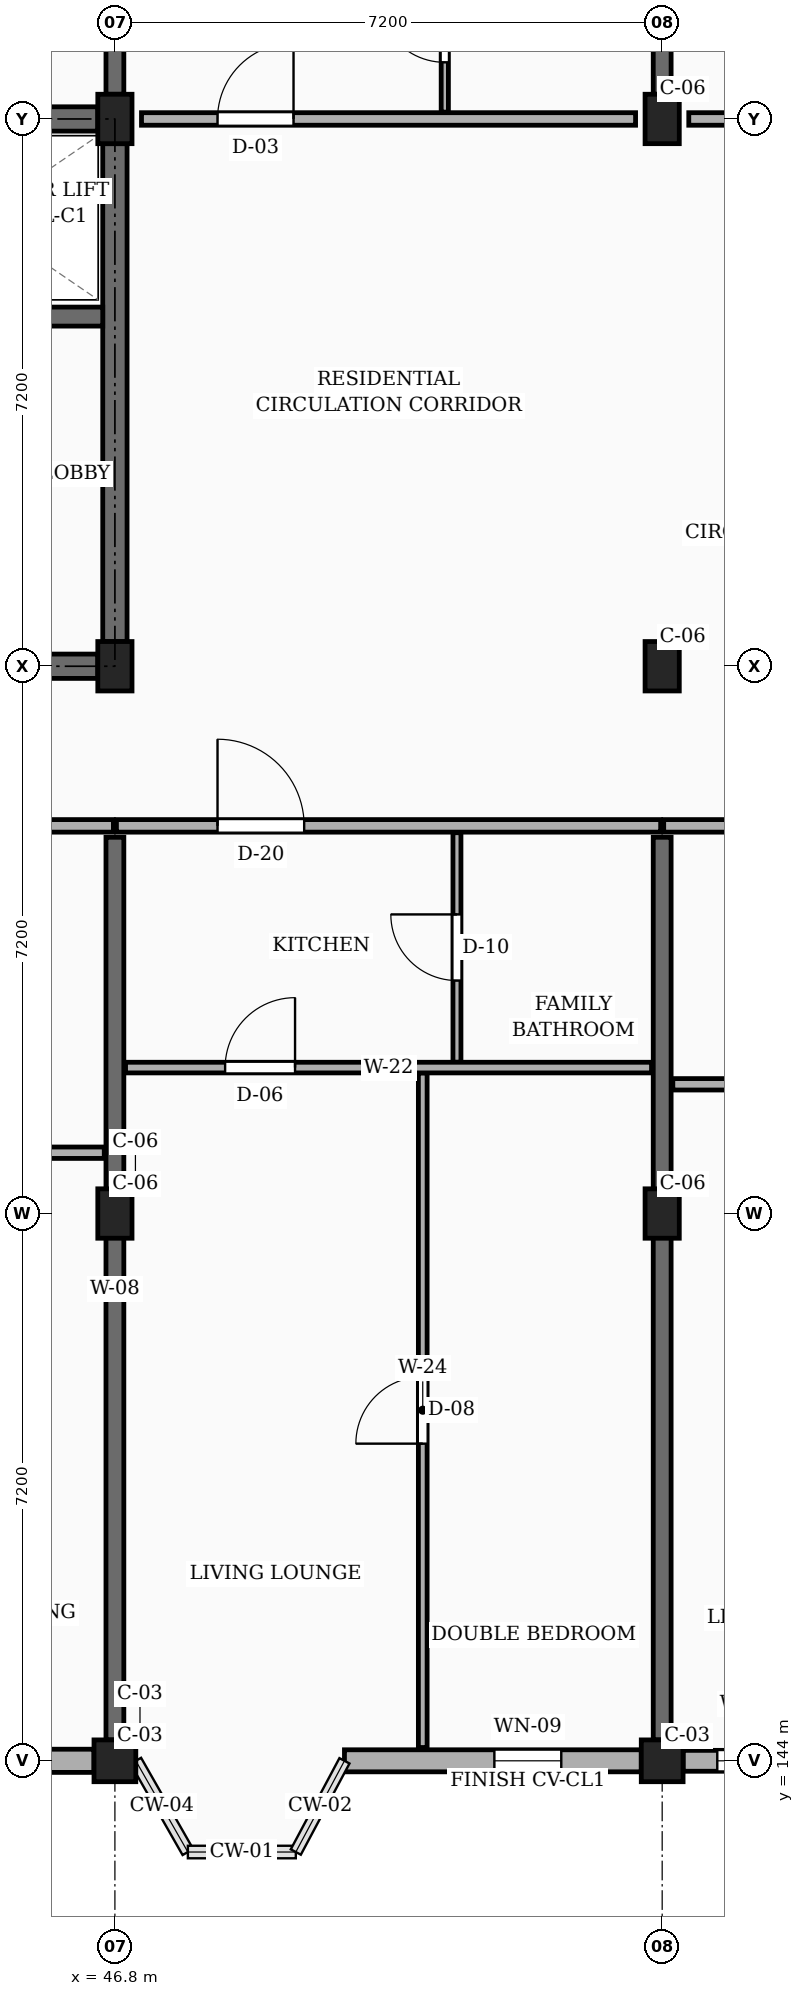
"""IFC4 building model, lengths in metres.
Left out: names, types, materials, properties, quantities, classifications, styles, units other than length and angle.
Written with IfcOpenShell. Run it as: python <this file> out.ifc"""

import sys

from ifc_helpers import new_model, si_unit, direction, frame, frame_2d, origin, origin_2d, place, context, subcontext, project, spatial, rectangle, extrude, element, fill, save


model = new_model("IFC4")
c1 = context("Model", 3, precision=1e-05, world=origin(), true_north=direction((0.0, 1.0)))
c2 = subcontext(c1, "Body", "Model", "MODEL_VIEW")
j1 = project(units=[si_unit("LENGTHUNIT", "METRE"), si_unit("PLANEANGLEUNIT", "RADIAN")], contexts=[c1])
p1 = place(None, origin())
s1 = spatial("IfcSite", under=j1, at=p1, CompositionType="ELEMENT")
p2 = place(p1, origin())
s2 = spatial("IfcBuilding", under=s1, at=p2, CompositionType="ELEMENT")
p3 = place(p2, frame((0.0, 0.0, 17.1)))
s3 = spatial("IfcBuildingStorey", under=s2, at=p3, CompositionType="ELEMENT", Elevation=17.1)
p4 = place(p3, frame((46.8, 144.0, 0.0), z_axis=(0.0, 0.0, 1.0), x_axis=(1.0, 0.0, 0.0)))
e1 = element("IfcColumn", 1, at=p4, inside=s3, PredefinedType="COLUMN", context=c2, shape_type="SweptSolid", body=[
    extrude(rectangle(XDim=0.55, YDim=0.55, at=origin_2d()), origin(), (0.0, 0.0, 1.0), 3.15),
])
for number, where, z_axis, x_axis in (
    (2, (46.8, 151.2, 0.0), (0.0, 0.0, 1.0), (1.0, 0.0, 0.0)),
    (3, (46.8, 158.4, 0.0), (0.0, 0.0, 1.0), (1.0, 0.0, 0.0)),
    (4, (46.8, 165.6, 0.0), (0.0, 0.0, 1.0), (1.0, 0.0, 0.0)),
):
    element("IfcColumn", number, at=place(p3, frame(where, z_axis=z_axis, x_axis=x_axis)), inside=s3, PredefinedType="COLUMN", context=c2, shape_type="SweptSolid", body=[
        extrude(rectangle(XDim=0.45, YDim=0.65, at=origin_2d()), origin(), (0.0, 0.0, 1.0), 3.15),
    ])
p5 = place(p3, frame((54.0, 144.0, 0.0), z_axis=(0.0, 0.0, 1.0), x_axis=(1.0, 0.0, 0.0)))
e5 = element("IfcColumn", 5, at=p5, inside=s3, PredefinedType="COLUMN", context=c2, shape_type="SweptSolid", body=[
    extrude(rectangle(XDim=0.55, YDim=0.55, at=origin_2d()), origin(), (0.0, 0.0, 1.0), 3.15),
])
for number, where, z_axis, x_axis in (
    (6, (54.0, 151.2, 0.0), (0.0, 0.0, 1.0), (1.0, 0.0, 0.0)),
    (7, (54.0, 158.4, 0.0), (0.0, 0.0, 1.0), (1.0, 0.0, 0.0)),
    (8, (54.0, 165.6, 0.0), (0.0, 0.0, 1.0), (1.0, 0.0, 0.0)),
):
    element("IfcColumn", number, at=place(p3, frame(where, z_axis=z_axis, x_axis=x_axis)), inside=s3, PredefinedType="COLUMN", context=c2, shape_type="SweptSolid", body=[
        extrude(rectangle(XDim=0.45, YDim=0.65, at=origin_2d()), origin(), (0.0, 0.0, 1.0), 3.15),
    ])
p6 = place(p3, frame((46.8, 144.275, 0.0), z_axis=(0.0, 0.0, 1.0), x_axis=(0.0, 1.0, 0.0)))
e9 = element("IfcWall", 9, at=p6, inside=s3, PredefinedType="SOLIDWALL", context=c2, shape_type="SweptSolid", body=[
    extrude(rectangle(XDim=11.875, YDim=0.235, at=frame_2d((5.938, 0.0))), origin(), (0.0, 0.0, 1.0), 2.185),
])
p7 = place(p3, frame((46.8, 165.925, 0.0), z_axis=(0.0, 0.0, 1.0), x_axis=(0.0, 1.0, 0.0)))
e10 = element("IfcWall", 10, at=p7, inside=s3, PredefinedType="SOLIDWALL", context=c2, shape_type="SweptSolid", body=[
    extrude(rectangle(XDim=6.6, YDim=0.235, at=frame_2d((3.3, 0.0))), origin(), (0.0, 0.0, 1.0), 2.185),
])
p8 = place(p3, frame((54.0, 144.275, 0.0), z_axis=(0.0, 0.0, 1.0), x_axis=(0.0, 1.0, 0.0)))
e11 = element("IfcWall", 11, at=p8, inside=s3, PredefinedType="SOLIDWALL", context=c2, shape_type="SweptSolid", body=[
    extrude(rectangle(XDim=11.875, YDim=0.235, at=frame_2d((5.938, 0.0))), origin(), (0.0, 0.0, 1.0), 2.185),
])
p9 = place(p3, frame((54.0, 165.925, 0.0), z_axis=(0.0, 0.0, 1.0), x_axis=(0.0, 1.0, 0.0)))
e12 = element("IfcWall", 12, at=p9, inside=s3, PredefinedType="SOLIDWALL", context=c2, shape_type="SweptSolid", body=[
    extrude(rectangle(XDim=6.6, YDim=0.235, at=frame_2d((3.3, 0.0))), origin(), (0.0, 0.0, 1.0), 2.185),
])
p10 = place(p3, frame((39.875, 144.0, 0.0), z_axis=(0.0, 0.0, 1.0), x_axis=(1.0, 0.0, 0.0)))
e13 = element("IfcWall", 13, at=p10, inside=s3, PredefinedType="SOLIDWALL", context=c2, shape_type="SweptSolid", body=[
    extrude(rectangle(XDim=6.65, YDim=0.305, at=frame_2d((3.325, 0.0))), origin(), (0.0, 0.0, 1.0), 2.455),
])
p11 = place(p10, frame((0.45, 0.0, 0.78)))
e14 = element("IfcOpeningElement", 14, at=p11, cuts=e13, PredefinedType="OPENING", context=c2, shape_type="SweptSolid", body=[
    extrude(rectangle(XDim=1.32, YDim=1.15, at=frame_2d((0.66, 0.575))), frame((0.0, 0.163, 0.0), z_axis=(0.0, -1.0, 0.0), x_axis=(1.0, 0.0, 0.0)), (0.0, 0.0, 1.0), 0.325),
])
p12 = place(p10, frame((4.65, 0.0, 0.78)))
e15 = element("IfcOpeningElement", 15, at=p12, cuts=e13, PredefinedType="OPENING", context=c2, shape_type="SweptSolid", body=[
    extrude(rectangle(XDim=0.88, YDim=1.26, at=frame_2d((0.44, 0.63))), frame((0.0, 0.163, 0.0), z_axis=(0.0, -1.0, 0.0), x_axis=(1.0, 0.0, 0.0)), (0.0, 0.0, 1.0), 0.325),
])
p13 = place(p3, frame((49.82, 144.0, 0.0), z_axis=(0.0, 0.0, 1.0), x_axis=(1.0, 0.0, 0.0)))
e16 = element("IfcWall", 16, at=p13, inside=s3, PredefinedType="SOLIDWALL", context=c2, shape_type="SweptSolid", body=[
    extrude(rectangle(XDim=3.905, YDim=0.29, at=frame_2d((1.953, 0.0))), origin(), (0.0, 0.0, 1.0), 2.455),
])
p14 = place(p13, frame((1.972, 0.0, 0.78)))
e17 = element("IfcOpeningElement", 17, at=p14, cuts=e16, PredefinedType="OPENING", context=c2, shape_type="SweptSolid", body=[
    extrude(rectangle(XDim=0.88, YDim=1.26, at=frame_2d((0.44, 0.63))), frame((0.0, 0.155, 0.0), z_axis=(0.0, -1.0, 0.0), x_axis=(1.0, 0.0, 0.0)), (0.0, 0.0, 1.0), 0.31),
])
p15 = place(p3, frame((54.275, 144.0, 0.0), z_axis=(0.0, 0.0, 1.0), x_axis=(1.0, 0.0, 0.0)))
e18 = element("IfcWall", 18, at=p15, inside=s3, PredefinedType="SOLIDWALL", context=c2, shape_type="SweptSolid", body=[
    extrude(rectangle(XDim=6.65, YDim=0.275, at=frame_2d((3.325, 0.0))), origin(), (0.0, 0.0, 1.0), 2.455),
])
p16 = place(p15, frame((0.45, 0.0, 0.78)))
e19 = element("IfcOpeningElement", 19, at=p16, cuts=e18, PredefinedType="OPENING", context=c2, shape_type="SweptSolid", body=[
    extrude(rectangle(XDim=0.96, YDim=1.26, at=frame_2d((0.48, 0.63))), frame((0.0, 0.147, 0.0), z_axis=(0.0, -1.0, 0.0), x_axis=(1.0, 0.0, 0.0)), (0.0, 0.0, 1.0), 0.295),
])
p17 = place(p15, frame((4.65, 0.0, 0.78)))
e20 = element("IfcOpeningElement", 20, at=p17, cuts=e18, PredefinedType="OPENING", context=c2, shape_type="SweptSolid", body=[
    extrude(rectangle(XDim=1.12, YDim=1.26, at=frame_2d((0.56, 0.63))), frame((0.0, 0.147, 0.0), z_axis=(0.0, -1.0, 0.0), x_axis=(1.0, 0.0, 0.0)), (0.0, 0.0, 1.0), 0.295),
])
p18 = place(p3, frame((39.825, 165.6, 0.0), z_axis=(0.0, 0.0, 1.0), x_axis=(1.0, 0.0, 0.0)))
e21 = element("IfcWall", 21, at=p18, inside=s3, PredefinedType="SHEAR", context=c2, shape_type="SweptSolid", body=[
    extrude(rectangle(XDim=6.75, YDim=0.32, at=frame_2d((3.375, 0.0))), origin(), (0.0, 0.0, 1.0), 2.885),
])
p19 = place(p3, frame((46.8, 158.725, 0.0), z_axis=(0.0, 0.0, 1.0), x_axis=(0.0, 1.0, 0.0)))
e22 = element("IfcWall", 22, at=p19, inside=s3, PredefinedType="SHEAR", context=c2, shape_type="SweptSolid", body=[
    extrude(rectangle(XDim=6.55, YDim=0.32, at=frame_2d((3.275, 0.0))), origin(), (0.0, 0.0, 1.0), 2.885),
])
p20 = place(p3, frame((39.825, 158.4, 0.0), z_axis=(0.0, 0.0, 1.0), x_axis=(1.0, 0.0, 0.0)))
e23 = element("IfcWall", 23, at=p20, inside=s3, PredefinedType="SHEAR", context=c2, shape_type="SweptSolid", body=[
    extrude(rectangle(XDim=6.75, YDim=0.32, at=frame_2d((3.375, 0.0))), origin(), (0.0, 0.0, 1.0), 2.885),
])
p21 = place(p20, frame((4.525, 0.0, 0.0)))
e24 = element("IfcOpeningElement", 24, at=p21, cuts=e23, PredefinedType="OPENING", context=c2, shape_type="SweptSolid", body=[
    extrude(rectangle(XDim=1.1, YDim=2.15, at=frame_2d((0.55, 1.075))), frame((0.0, 0.17, 0.0), z_axis=(0.0, -1.0, 0.0), x_axis=(1.0, 0.0, 0.0)), (0.0, 0.0, 1.0), 0.34),
])
p22 = place(p3, frame((43.325, 163.0, 0.0), z_axis=(0.0, 0.0, 1.0), x_axis=(1.0, 0.0, 0.0)))
e25 = element("IfcWall", 25, at=p22, inside=s3, PredefinedType="SHEAR", context=c2, shape_type="SweptSolid", body=[
    extrude(rectangle(XDim=3.315, YDim=0.25, at=frame_2d((1.657, 0.0))), origin(), (0.0, 0.0, 1.0), 2.885),
])
p23 = place(p22, frame((1.1, 0.0, 0.0)))
e26 = element("IfcOpeningElement", 26, at=p23, cuts=e25, PredefinedType="OPENING", context=c2, shape_type="SweptSolid", body=[
    extrude(rectangle(XDim=1.0, YDim=2.2, at=frame_2d((0.5, 1.1))), frame((0.0, 0.135, 0.0), z_axis=(0.0, -1.0, 0.0), x_axis=(1.0, 0.0, 0.0)), (0.0, 0.0, 1.0), 0.27),
])
p24 = place(p3, frame((39.62, 156.3, 0.0), z_axis=(0.0, 0.0, 1.0), x_axis=(1.0, 0.0, 0.0)))
e27 = element("IfcWall", 27, at=p24, inside=s3, PredefinedType="PARTITIONING", context=c2, shape_type="SweptSolid", body=[
    extrude(rectangle(XDim=7.16, YDim=0.165, at=frame_2d((3.58, 0.0))), origin(), (0.0, 0.0, 1.0), 2.32),
])
p25 = place(p24, frame((4.78, 0.0, 0.0)))
e28 = element("IfcOpeningElement", 28, at=p25, cuts=e27, PredefinedType="OPENING", context=c2, shape_type="SweptSolid", body=[
    extrude(rectangle(XDim=0.94, YDim=2.12, at=frame_2d((0.47, 1.06))), frame((0.0, 0.093, 0.0), z_axis=(0.0, -1.0, 0.0), x_axis=(1.0, 0.0, 0.0)), (0.0, 0.0, 1.0), 0.185),
])
p26 = place(p3, frame((46.82, 156.3, 0.0), z_axis=(0.0, 0.0, 1.0), x_axis=(1.0, 0.0, 0.0)))
e29 = element("IfcWall", 29, at=p26, inside=s3, PredefinedType="PARTITIONING", context=c2, shape_type="SweptSolid", body=[
    extrude(rectangle(XDim=7.16, YDim=0.165, at=frame_2d((3.58, 0.0))), origin(), (0.0, 0.0, 1.0), 2.32),
])
p27 = place(p26, frame((1.33, 0.0, 0.0)))
e30 = element("IfcOpeningElement", 30, at=p27, cuts=e29, PredefinedType="OPENING", context=c2, shape_type="SweptSolid", body=[
    extrude(rectangle(XDim=1.14, YDim=2.18, at=frame_2d((0.57, 1.09))), frame((0.0, 0.093, 0.0), z_axis=(0.0, -1.0, 0.0), x_axis=(1.0, 0.0, 0.0)), (0.0, 0.0, 1.0), 0.185),
])
p28 = place(p3, frame((54.02, 156.3, 0.0), z_axis=(0.0, 0.0, 1.0), x_axis=(1.0, 0.0, 0.0)))
e31 = element("IfcWall", 31, at=p28, inside=s3, PredefinedType="PARTITIONING", context=c2, shape_type="SweptSolid", body=[
    extrude(rectangle(XDim=7.16, YDim=0.165, at=frame_2d((3.58, 0.0))), origin(), (0.0, 0.0, 1.0), 2.32),
])
p29 = place(p28, frame((1.33, 0.0, 0.0)))
e32 = element("IfcOpeningElement", 32, at=p29, cuts=e31, PredefinedType="OPENING", context=c2, shape_type="SweptSolid", body=[
    extrude(rectangle(XDim=1.0, YDim=2.15, at=frame_2d((0.5, 1.075))), frame((0.0, 0.093, 0.0), z_axis=(0.0, -1.0, 0.0), x_axis=(1.0, 0.0, 0.0)), (0.0, 0.0, 1.0), 0.185),
])
p30 = place(p3, frame((47.15, 165.6, 0.0), z_axis=(0.0, 0.0, 1.0), x_axis=(1.0, 0.0, 0.0)))
e33 = element("IfcWall", 33, at=p30, inside=s3, PredefinedType="PARTITIONING", context=c2, shape_type="SweptSolid", body=[
    extrude(rectangle(XDim=6.5, YDim=0.165, at=frame_2d((3.25, 0.0))), origin(), (0.0, 0.0, 1.0), 2.235),
])
p31 = place(p30, frame((1.0, 0.0, 0.0)))
e34 = element("IfcOpeningElement", 34, at=p31, cuts=e33, PredefinedType="OPENING", context=c2, shape_type="SweptSolid", body=[
    extrude(rectangle(XDim=1.0, YDim=2.15, at=frame_2d((0.5, 1.075))), frame((0.0, 0.093, 0.0), z_axis=(0.0, -1.0, 0.0), x_axis=(1.0, 0.0, 0.0)), (0.0, 0.0, 1.0), 0.185),
])
p32 = place(p3, frame((54.35, 165.6, 0.0), z_axis=(0.0, 0.0, 1.0), x_axis=(1.0, 0.0, 0.0)))
e35 = element("IfcWall", 35, at=p32, inside=s3, PredefinedType="PARTITIONING", context=c2, shape_type="SweptSolid", body=[
    extrude(rectangle(XDim=6.5, YDim=0.165, at=frame_2d((3.25, 0.0))), origin(), (0.0, 0.0, 1.0), 2.235),
])
p33 = place(p32, frame((1.0, 0.0, 0.0)))
e36 = element("IfcOpeningElement", 36, at=p33, cuts=e35, PredefinedType="OPENING", context=c2, shape_type="SweptSolid", body=[
    extrude(rectangle(XDim=0.94, YDim=2.12, at=frame_2d((0.47, 1.06))), frame((0.0, 0.093, 0.0), z_axis=(0.0, -1.0, 0.0), x_axis=(1.0, 0.0, 0.0)), (0.0, 0.0, 1.0), 0.185),
])
p34 = place(p3, frame((39.74, 152.0, 0.0), z_axis=(0.0, 0.0, 1.0), x_axis=(1.0, 0.0, 0.0)))
e37 = element("IfcWall", 37, at=p34, inside=s3, PredefinedType="PARTITIONING", context=c2, shape_type="SweptSolid", body=[
    extrude(rectangle(XDim=6.92, YDim=0.15, at=frame_2d((3.46, 0.0))), origin(), (0.0, 0.0, 1.0), 2.32),
])
p35 = place(p34, frame((4.66, 0.0, 0.0)))
e38 = element("IfcOpeningElement", 38, at=p35, cuts=e37, PredefinedType="OPENING", context=c2, shape_type="SweptSolid", body=[
    extrude(rectangle(XDim=0.95, YDim=2.1, at=frame_2d((0.475, 1.05))), frame((0.0, 0.085, 0.0), z_axis=(0.0, -1.0, 0.0), x_axis=(1.0, 0.0, 0.0)), (0.0, 0.0, 1.0), 0.17),
])
p36 = place(p3, frame((50.85, 144.175, 0.0), z_axis=(0.0, 0.0, 1.0), x_axis=(0.0, 1.0, 0.0)))
e39 = element("IfcWall", 39, at=p36, inside=s3, PredefinedType="PARTITIONING", context=c2, shape_type="SweptSolid", body=[
    extrude(rectangle(XDim=8.875, YDim=0.115, at=frame_2d((4.438, 0.0))), origin(), (0.0, 0.0, 1.0), 2.32),
])
p37 = place(p36, frame((3.998, 0.0, 0.0)))
e40 = element("IfcOpeningElement", 40, at=p37, cuts=e39, PredefinedType="OPENING", context=c2, shape_type="SweptSolid", body=[
    extrude(rectangle(XDim=0.88, YDim=2.08, at=frame_2d((0.44, 1.04))), frame((0.0, 0.067, 0.0), z_axis=(0.0, -1.0, 0.0), x_axis=(1.0, 0.0, 0.0)), (0.0, 0.0, 1.0), 0.135),
])
p38 = place(p3, frame((51.3, 153.19, 0.0), z_axis=(0.0, 0.0, 1.0), x_axis=(0.0, 1.0, 0.0)))
e41 = element("IfcWall", 41, at=p38, inside=s3, PredefinedType="PARTITIONING", context=c2, shape_type="SweptSolid", body=[
    extrude(rectangle(XDim=3.02, YDim=0.105, at=frame_2d((1.51, 0.0))), origin(), (0.0, 0.0, 1.0), 2.32),
])
p39 = place(p38, frame((1.075, 0.0, 0.0)))
e42 = element("IfcOpeningElement", 42, at=p39, cuts=e41, PredefinedType="OPENING", context=c2, shape_type="SweptSolid", body=[
    extrude(rectangle(XDim=0.87, YDim=2.05, at=frame_2d((0.435, 1.025))), frame((0.0, 0.062, 0.0), z_axis=(0.0, -1.0, 0.0), x_axis=(1.0, 0.0, 0.0)), (0.0, 0.0, 1.0), 0.125),
])
p40 = place(p3, frame((46.94, 153.12, 0.0), z_axis=(0.0, 0.0, 1.0), x_axis=(1.0, 0.0, 0.0)))
e43 = element("IfcWall", 43, at=p40, inside=s3, PredefinedType="PARTITIONING", context=c2, shape_type="SweptSolid", body=[
    extrude(rectangle(XDim=6.92, YDim=0.14, at=frame_2d((3.46, 0.0))), origin(), (0.0, 0.0, 1.0), 2.32),
])
p41 = place(p40, frame((1.31, 0.0, 0.0)))
e44 = element("IfcOpeningElement", 44, at=p41, cuts=e43, PredefinedType="OPENING", context=c2, shape_type="SweptSolid", body=[
    extrude(rectangle(XDim=0.92, YDim=2.1, at=frame_2d((0.46, 1.05))), frame((0.0, 0.08, 0.0), z_axis=(0.0, -1.0, 0.0), x_axis=(1.0, 0.0, 0.0)), (0.0, 0.0, 1.0), 0.16),
])
p42 = place(p3, frame((51.14, 165.69, 0.0), z_axis=(0.0, 0.0, 1.0), x_axis=(0.0, 1.0, 0.0)))
e45 = element("IfcWall", 45, at=p42, inside=s3, PredefinedType="PARTITIONING", context=c2, shape_type="SweptSolid", body=[
    extrude(rectangle(XDim=2.18, YDim=0.095, at=frame_2d((1.09, 0.0))), origin(), (0.0, 0.0, 1.0), 2.32),
])
p43 = place(p42, frame((0.655, 0.0, 0.0)))
e46 = element("IfcOpeningElement", 46, at=p43, cuts=e45, PredefinedType="OPENING", context=c2, shape_type="SweptSolid", body=[
    extrude(rectangle(XDim=0.87, YDim=2.05, at=frame_2d((0.435, 1.025))), frame((0.0, 0.058, 0.0), z_axis=(0.0, -1.0, 0.0), x_axis=(1.0, 0.0, 0.0)), (0.0, 0.0, 1.0), 0.115),
])
p44 = place(p3, frame((54.14, 152.9, 0.0), z_axis=(0.0, 0.0, 1.0), x_axis=(1.0, 0.0, 0.0)))
e47 = element("IfcWall", 47, at=p44, inside=s3, PredefinedType="PARTITIONING", context=c2, shape_type="SweptSolid", body=[
    extrude(rectangle(XDim=6.92, YDim=0.15, at=frame_2d((3.46, 0.0))), origin(), (0.0, 0.0, 1.0), 2.32),
])
p45 = place(p44, frame((1.31, 0.0, 0.0)))
e48 = element("IfcOpeningElement", 48, at=p45, cuts=e47, PredefinedType="OPENING", context=c2, shape_type="SweptSolid", body=[
    extrude(rectangle(XDim=0.95, YDim=2.1, at=frame_2d((0.475, 1.05))), frame((0.0, 0.085, 0.0), z_axis=(0.0, -1.0, 0.0), x_axis=(1.0, 0.0, 0.0)), (0.0, 0.0, 1.0), 0.17),
])
p46 = place(p14, origin())
e49 = element("IfcWindow", 49, at=p46, inside=s3, PartitioningType="SINGLE_PANEL", PredefinedType="WINDOW", context=c2, shape_type="SweptSolid", body=[
    extrude(rectangle(XDim=0.88, YDim=1.26, at=frame_2d((0.44, 0.63))), frame((0.0, 0.03, 0.0), z_axis=(0.0, -1.0, 0.0), x_axis=(1.0, 0.0, 0.0)), (0.0, 0.0, 1.0), 0.06),
])
fill(e17, e49)
p47 = place(p16, origin())
e50 = element("IfcWindow", 50, at=p47, inside=s3, PartitioningType="SINGLE_PANEL", PredefinedType="WINDOW", context=c2, shape_type="SweptSolid", body=[
    extrude(rectangle(XDim=0.96, YDim=1.26, at=frame_2d((0.48, 0.63))), frame((0.0, 0.03, 0.0), z_axis=(0.0, -1.0, 0.0), x_axis=(1.0, 0.0, 0.0)), (0.0, 0.0, 1.0), 0.06),
])
fill(e19, e50)
p48 = place(p27, origin())
e51 = element("IfcDoor", 51, at=p48, inside=s3, OperationType="SINGLE_SWING_LEFT", PredefinedType="DOOR", context=c2, shape_type="SweptSolid", body=[
    extrude(rectangle(XDim=1.14, YDim=2.18, at=frame_2d((0.57, 1.09))), frame((0.0, 0.025, 0.0), z_axis=(0.0, -1.0, 0.0), x_axis=(1.0, 0.0, 0.0)), (0.0, 0.0, 1.0), 0.05),
])
fill(e30, e51)
p49 = place(p31, origin())
e52 = element("IfcDoor", 52, at=p49, inside=s3, OperationType="SINGLE_SWING_RIGHT", PredefinedType="DOOR", context=c2, shape_type="SweptSolid", body=[
    extrude(rectangle(XDim=1.0, YDim=2.15, at=frame_2d((0.5, 1.075))), frame((0.0, 0.025, 0.0), z_axis=(0.0, -1.0, 0.0), x_axis=(1.0, 0.0, 0.0)), (0.0, 0.0, 1.0), 0.05),
])
fill(e34, e52)
p50 = place(p37, origin())
e53 = element("IfcDoor", 53, at=p50, inside=s3, OperationType="SINGLE_SWING_LEFT", PredefinedType="DOOR", context=c2, shape_type="SweptSolid", body=[
    extrude(rectangle(XDim=0.88, YDim=2.08, at=frame_2d((0.44, 1.04))), frame((0.0, 0.025, 0.0), z_axis=(0.0, -1.0, 0.0), x_axis=(1.0, 0.0, 0.0)), (0.0, 0.0, 1.0), 0.05),
])
fill(e40, e53)
p51 = place(p39, origin())
e54 = element("IfcDoor", 54, at=p51, inside=s3, OperationType="SINGLE_SWING_RIGHT", PredefinedType="DOOR", context=c2, shape_type="SweptSolid", body=[
    extrude(rectangle(XDim=0.87, YDim=2.05, at=frame_2d((0.435, 1.025))), frame((0.0, 0.025, 0.0), z_axis=(0.0, -1.0, 0.0), x_axis=(1.0, 0.0, 0.0)), (0.0, 0.0, 1.0), 0.05),
])
fill(e42, e54)
p52 = place(p41, origin())
e55 = element("IfcDoor", 55, at=p52, inside=s3, OperationType="SINGLE_SWING_RIGHT", PredefinedType="DOOR", context=c2, shape_type="SweptSolid", body=[
    extrude(rectangle(XDim=0.92, YDim=2.1, at=frame_2d((0.46, 1.05))), frame((0.0, 0.025, 0.0), z_axis=(0.0, -1.0, 0.0), x_axis=(1.0, 0.0, 0.0)), (0.0, 0.0, 1.0), 0.05),
])
fill(e44, e55)
p53 = place(p43, origin())
e56 = element("IfcDoor", 56, at=p53, inside=s3, OperationType="SINGLE_SWING_RIGHT", PredefinedType="DOOR", context=c2, shape_type="SweptSolid", body=[
    extrude(rectangle(XDim=0.87, YDim=2.05, at=frame_2d((0.435, 1.025))), frame((0.0, 0.025, 0.0), z_axis=(0.0, -1.0, 0.0), x_axis=(1.0, 0.0, 0.0)), (0.0, 0.0, 1.0), 0.05),
])
fill(e46, e56)
save(model, sys.argv[1])
